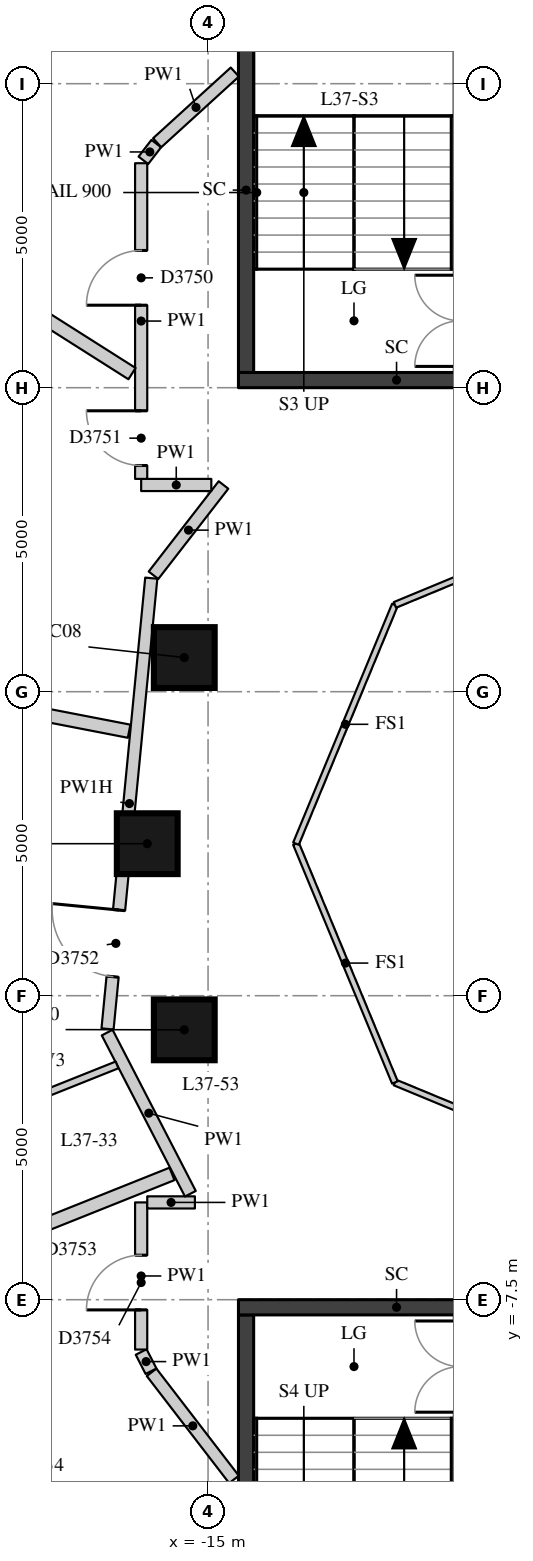
"""IFC4 building model, lengths in metres.
Left out: names, types, materials, properties, quantities, classifications, styles, units other than length and angle.
Written with IfcOpenShell. Run it as: python <this file> out.ifc"""

import sys

from ifc_helpers import new_model, si_unit, direction, frame, frame_2d, origin, origin_2d, place, context, subcontext, project, spatial, rectangle, extrude, element, fill, save


model = new_model("IFC4")
c1 = context("Model", 3, precision=1e-05, world=origin(), true_north=direction((0.0, 1.0)))
c2 = subcontext(c1, "Body", "Model", "MODEL_VIEW")
j1 = project(units=[si_unit("LENGTHUNIT", "METRE"), si_unit("PLANEANGLEUNIT", "RADIAN")], contexts=[c1])
p1 = place(None, origin())
s1 = spatial("IfcSite", under=j1, at=p1, CompositionType="ELEMENT")
p2 = place(p1, origin())
s2 = spatial("IfcBuilding", under=s1, at=p2, CompositionType="ELEMENT")
p3 = place(p2, frame((0.0, 0.0, 131.8)))
s3 = spatial("IfcBuildingStorey", under=s2, at=p3, CompositionType="ELEMENT", Elevation=131.8)
for number, where, z_axis, x_axis in (
    (1, (-15.391, 3.062, 0.0), (0.0, 0.0, 1.0), (1.0, 0.0, 0.0)),
    (2, (-16.0, 0.0, 0.0), (0.0, 0.0, 1.0), (1.0, 0.0, 0.0)),
    (3, (-15.391, -3.062, 0.0), (0.0, 0.0, 1.0), (1.0, 0.0, 0.0)),
):
    element("IfcColumn", number, at=place(p3, frame(where, z_axis=z_axis, x_axis=x_axis)), inside=s3, PredefinedType="COLUMN", context=c2, shape_type="SweptSolid", body=[
        extrude(rectangle(XDim=1.0, YDim=1.0, at=origin_2d()), origin(), (0.0, 0.0, 1.0), 3.3),
    ])
p4 = place(p3, frame((-14.375, 7.75, -0.28), z_axis=(0.0, 0.0, 1.0), x_axis=(0.0, 1.0, 0.0)))
e4 = element("IfcWall", 4, at=p4, inside=s3, PredefinedType="SHEAR", context=c2, shape_type="SweptSolid", body=[
    extrude(rectangle(XDim=6.0, YDim=0.25, at=frame_2d((3.0, 0.0))), origin(), (0.0, 0.0, 1.0), 3.13),
])
p5 = place(p3, frame((-14.5, 7.625, -0.28), z_axis=(0.0, 0.0, 1.0), x_axis=(1.0, 0.0, 0.0)))
e5 = element("IfcWall", 5, at=p5, inside=s3, PredefinedType="SHEAR", context=c2, shape_type="SweptSolid", body=[
    extrude(rectangle(XDim=5.2, YDim=0.25, at=frame_2d((2.6, 0.0))), origin(), (0.0, 0.0, 1.0), 3.13),
])
p6 = place(p3, frame((-14.375, -13.75, -0.28), z_axis=(0.0, 0.0, 1.0), x_axis=(0.0, 1.0, 0.0)))
e6 = element("IfcWall", 6, at=p6, inside=s3, PredefinedType="SHEAR", context=c2, shape_type="SweptSolid", body=[
    extrude(rectangle(XDim=6.0, YDim=0.25, at=frame_2d((3.0, 0.0))), origin(), (0.0, 0.0, 1.0), 3.13),
])
p7 = place(p3, frame((-14.5, -7.625, -0.28), z_axis=(0.0, 0.0, 1.0), x_axis=(1.0, 0.0, 0.0)))
e7 = element("IfcWall", 7, at=p7, inside=s3, PredefinedType="SHEAR", context=c2, shape_type="SweptSolid", body=[
    extrude(rectangle(XDim=5.2, YDim=0.25, at=frame_2d((2.6, 0.0))), origin(), (0.0, 0.0, 1.0), 3.13),
])
p8 = place(p3, frame((-14.573, -10.456, 0.0), z_axis=(0.0, 0.0, 1.0), x_axis=(-0.60967360535, 0.792652568872, 0.0)))
e8 = element("IfcWall", 8, at=p8, inside=s3, PredefinedType="PARTITIONING", context=c2, shape_type="SweptSolid", body=[
    extrude(rectangle(XDim=2.223, YDim=0.2, at=frame_2d((1.111, 0.0))), origin(), (0.0, 0.0, 1.0), 2.85),
])
p9 = place(p3, frame((-15.938, -8.676, 0.0), z_axis=(0.0, 0.0, 1.0), x_axis=(-0.456525695549, 0.889710227717, 0.0)))
e9 = element("IfcWall", 9, at=p9, inside=s3, PredefinedType="PARTITIONING", context=c2, shape_type="SweptSolid", body=[
    extrude(rectangle(XDim=0.356, YDim=0.2, at=frame_2d((0.178, 0.0))), origin(), (0.0, 0.0, 1.0), 2.85),
])
p10 = place(p3, frame((-16.1, -8.32, 0.0), z_axis=(0.0, 0.0, 1.0), x_axis=(0.0, 1.0, 0.0)))
e10 = element("IfcWall", 10, at=p10, inside=s3, PredefinedType="PARTITIONING", context=c2, shape_type="SweptSolid", body=[
    extrude(rectangle(XDim=2.42, YDim=0.2, at=frame_2d((1.21, 0.0))), origin(), (0.0, 0.0, 1.0), 2.85),
])
p11 = place(p10, frame((0.652, 0.0, 0.0)))
e11 = element("IfcOpeningElement", 11, at=p11, cuts=e10, PredefinedType="OPENING", context=c2, shape_type="SweptSolid", body=[
    extrude(rectangle(XDim=0.9, YDim=2.1, at=frame_2d((0.45, 1.05))), frame((0.0, 0.11, 0.0), z_axis=(0.0, -1.0, 0.0), x_axis=(1.0, 0.0, 0.0)), (0.0, 0.0, 1.0), 0.22),
])
p12 = place(p3, frame((-16.0, -5.9, 0.0), z_axis=(0.0, 0.0, 1.0), x_axis=(1.0, 0.0, 0.0)))
e12 = element("IfcWall", 12, at=p12, inside=s3, PredefinedType="PARTITIONING", context=c2, shape_type="SweptSolid", body=[
    extrude(rectangle(XDim=0.784, YDim=0.2, at=frame_2d((0.392, 0.0))), origin(), (0.0, 0.0, 1.0), 2.85),
])
p13 = place(p3, frame((-15.291, -5.757, 0.0), z_axis=(0.0, 0.0, 1.0), x_axis=(-0.45873256191, 0.888574384418, 0.0)))
e13 = element("IfcWall", 13, at=p13, inside=s3, PredefinedType="PARTITIONING", context=c2, shape_type="SweptSolid", body=[
    extrude(rectangle(XDim=2.983, YDim=0.2, at=frame_2d((1.491, 0.0))), origin(), (0.0, 0.0, 1.0), 2.85),
])
p14 = place(p3, frame((-16.653, -3.047, 0.0), z_axis=(0.0, 0.0, 1.0), x_axis=(0.096559879606, 0.995327177189, 0.0)))
e14 = element("IfcWall", 14, at=p14, inside=s3, PredefinedType="PARTITIONING", context=c2, shape_type="SweptSolid", body=[
    extrude(rectangle(XDim=7.449, YDim=0.2, at=frame_2d((3.724, 0.0))), origin(), (0.0, 0.0, 1.0), 2.35),
])
p15 = place(p14, frame((0.864, 0.0, 0.0)))
e15 = element("IfcOpeningElement", 15, at=p15, cuts=e14, PredefinedType="OPENING", context=c2, shape_type="SweptSolid", body=[
    extrude(rectangle(XDim=1.1, YDim=2.1, at=frame_2d((0.55, 1.05))), frame((0.0, 0.11, 0.0), z_axis=(0.0, -1.0, 0.0), x_axis=(1.0, 0.0, 0.0)), (0.0, 0.0, 1.0), 0.22),
])
p16 = place(p3, frame((-15.897, 4.415, 0.0), z_axis=(0.0, 0.0, 1.0), x_axis=(0.612626457361, 0.790372585393, 0.0)))
e16 = element("IfcWall", 16, at=p16, inside=s3, PredefinedType="PARTITIONING", context=c2, shape_type="SweptSolid", body=[
    extrude(rectangle(XDim=1.879, YDim=0.2, at=frame_2d((0.939, 0.0))), origin(), (0.0, 0.0, 1.0), 2.85),
])
p17 = place(p3, frame((-14.946, 5.9, 0.0), z_axis=(0.0, 0.0, 1.0), x_axis=(-1.0, 0.0, 0.0)))
e17 = element("IfcWall", 17, at=p17, inside=s3, PredefinedType="PARTITIONING", context=c2, shape_type="SweptSolid", body=[
    extrude(rectangle(XDim=1.154, YDim=0.2, at=frame_2d((0.577, 0.0))), origin(), (0.0, 0.0, 1.0), 2.85),
])
p18 = place(p3, frame((-16.1, 6.0, 0.0), z_axis=(0.0, 0.0, 1.0), x_axis=(0.0, 1.0, 0.0)))
e18 = element("IfcWall", 18, at=p18, inside=s3, PredefinedType="PARTITIONING", context=c2, shape_type="SweptSolid", body=[
    extrude(rectangle(XDim=5.192, YDim=0.2, at=frame_2d((2.596, 0.0))), origin(), (0.0, 0.0, 1.0), 2.85),
])
p19 = place(p18, frame((2.857, 0.0, 0.0)))
e19 = element("IfcOpeningElement", 19, at=p19, cuts=e18, PredefinedType="OPENING", context=c2, shape_type="SweptSolid", body=[
    extrude(rectangle(XDim=0.9, YDim=2.1, at=frame_2d((0.45, 1.05))), frame((0.0, 0.11, 0.0), z_axis=(0.0, -1.0, 0.0), x_axis=(1.0, 0.0, 0.0)), (0.0, 0.0, 1.0), 0.22),
])
p20 = place(p18, frame((0.22, 0.0, 0.0)))
e20 = element("IfcOpeningElement", 20, at=p20, cuts=e18, PredefinedType="OPENING", context=c2, shape_type="SweptSolid", body=[
    extrude(rectangle(XDim=0.9, YDim=2.1, at=frame_2d((0.45, 1.05))), frame((0.0, 0.11, 0.0), z_axis=(0.0, -1.0, 0.0), x_axis=(1.0, 0.0, 0.0)), (0.0, 0.0, 1.0), 0.22),
])
p21 = place(p3, frame((-16.063, 11.24, 0.0), z_axis=(0.0, 0.0, 1.0), x_axis=(0.609744747854, 0.792597844096, 0.0)))
e21 = element("IfcWall", 21, at=p21, inside=s3, PredefinedType="PARTITIONING", context=c2, shape_type="SweptSolid", body=[
    extrude(rectangle(XDim=0.347, YDim=0.2, at=frame_2d((0.174, 0.0))), origin(), (0.0, 0.0, 1.0), 2.85),
])
p22 = place(p3, frame((-15.837, 11.528, 0.0), z_axis=(0.0, 0.0, 1.0), x_axis=(0.739402681643, 0.673263450946, 0.0)))
e22 = element("IfcWall", 22, at=p22, inside=s3, PredefinedType="PARTITIONING", context=c2, shape_type="SweptSolid", body=[
    extrude(rectangle(XDim=1.728, YDim=0.2, at=frame_2d((0.864, 0.0))), origin(), (0.0, 0.0, 1.0), 2.85),
])
p23 = place(p3, frame((-21.126, 10.823, 0.0), z_axis=(0.0, 0.0, 1.0), x_axis=(0.844518840625, -0.535525842355, 0.0)))
e23 = element("IfcWall", 23, at=p23, inside=s3, PredefinedType="PARTITIONING", context=c2, shape_type="SweptSolid", body=[
    extrude(rectangle(XDim=5.773, YDim=0.22, at=frame_2d((2.887, 0.0))), origin(), (0.0, 0.0, 1.0), 2.85),
])
p24 = place(p3, frame((-24.118, 3.364, 0.0), z_axis=(0.0, 0.0, 1.0), x_axis=(0.981757892546, -0.190135321348, 0.0)))
e24 = element("IfcWall", 24, at=p24, inside=s3, PredefinedType="PARTITIONING", context=c2, shape_type="SweptSolid", body=[
    extrude(rectangle(XDim=7.965, YDim=0.22, at=frame_2d((3.982, 0.0))), origin(), (0.0, 0.0, 1.0), 2.3),
])
p25 = place(p3, frame((-21.736, -7.887, 0.0), z_axis=(0.0, 0.0, 1.0), x_axis=(0.928547942842, 0.371212496884, 0.0)))
e25 = element("IfcWall", 25, at=p25, inside=s3, PredefinedType="PARTITIONING", context=c2, shape_type="SweptSolid", body=[
    extrude(rectangle(XDim=6.615, YDim=0.22, at=frame_2d((3.308, 0.0))), origin(), (0.0, 0.0, 1.0), 2.85),
])
p26 = place(p3, frame((-16.497, -3.638, 0.0), z_axis=(0.0, 0.0, 1.0), x_axis=(-0.92857071808, -0.371155522019, 0.0)))
e26 = element("IfcWall", 26, at=p26, inside=s3, PredefinedType="PARTITIONING", context=c2, shape_type="SweptSolid", body=[
    extrude(rectangle(XDim=2.506, YDim=0.12, at=frame_2d((1.253, 0.0))), origin(), (0.0, 0.0, 1.0), 2.85),
])
for number, where, z_axis, x_axis in (
    (27, (-8.0, -5.554, 0.0), (0.0, 0.0, 1.0), (-0.924, 0.383, 0.0)),
    (28, (-11.927, -3.927, 0.0), (0.0, 0.0, 1.0), (-0.383, 0.924, 0.0)),
    (29, (-13.554, 0.0, 0.0), (0.0, 0.0, 1.0), (0.383, 0.924, 0.0)),
    (30, (-11.927, 3.927, 0.0), (0.0, 0.0, 1.0), (0.924, 0.383, 0.0)),
):
    element("IfcWall", number, at=place(p3, frame(where, z_axis=z_axis, x_axis=x_axis)), inside=s3, PredefinedType="PARTITIONING", context=c2, shape_type="SweptSolid", body=[
        extrude(rectangle(XDim=4.251, YDim=0.1, at=frame_2d((2.125, 0.0))), origin(), (0.0, 0.0, 1.0), 2.85),
    ])
p27 = place(p19, origin())
e31 = element("IfcDoor", 31, at=p27, inside=s3, OperationType="SINGLE_SWING_LEFT", PredefinedType="DOOR", context=c2, shape_type="SweptSolid", body=[
    extrude(rectangle(XDim=0.9, YDim=2.1, at=frame_2d((0.45, 1.05))), frame((0.0, 0.025, 0.0), z_axis=(0.0, -1.0, 0.0), x_axis=(1.0, 0.0, 0.0)), (0.0, 0.0, 1.0), 0.05),
])
fill(e19, e31)
p28 = place(p20, origin())
e32 = element("IfcDoor", 32, at=p28, inside=s3, OperationType="SINGLE_SWING_RIGHT", PredefinedType="DOOR", context=c2, shape_type="SweptSolid", body=[
    extrude(rectangle(XDim=0.9, YDim=2.1, at=frame_2d((0.45, 1.05))), frame((0.0, 0.025, 0.0), z_axis=(0.0, -1.0, 0.0), x_axis=(1.0, 0.0, 0.0)), (0.0, 0.0, 1.0), 0.05),
])
fill(e20, e32)
p29 = place(p15, origin())
e33 = element("IfcDoor", 33, at=p29, inside=s3, OperationType="SINGLE_SWING_RIGHT", PredefinedType="DOOR", context=c2, shape_type="SweptSolid", body=[
    extrude(rectangle(XDim=1.1, YDim=2.1, at=frame_2d((0.55, 1.05))), frame((0.0, 0.025, 0.0), z_axis=(0.0, -1.0, 0.0), x_axis=(1.0, 0.0, 0.0)), (0.0, 0.0, 1.0), 0.05),
])
fill(e15, e33)
p30 = place(p11, origin())
e34 = element("IfcDoor", 34, at=p30, inside=s3, OperationType="SINGLE_SWING_LEFT", PredefinedType="DOOR", context=c2, shape_type="SweptSolid", body=[
    extrude(rectangle(XDim=0.9, YDim=2.1, at=frame_2d((0.45, 1.05))), frame((0.0, 0.025, 0.0), z_axis=(0.0, -1.0, 0.0), x_axis=(1.0, 0.0, 0.0)), (0.0, 0.0, 1.0), 0.05),
])
fill(e11, e34)
save(model, sys.argv[1])
